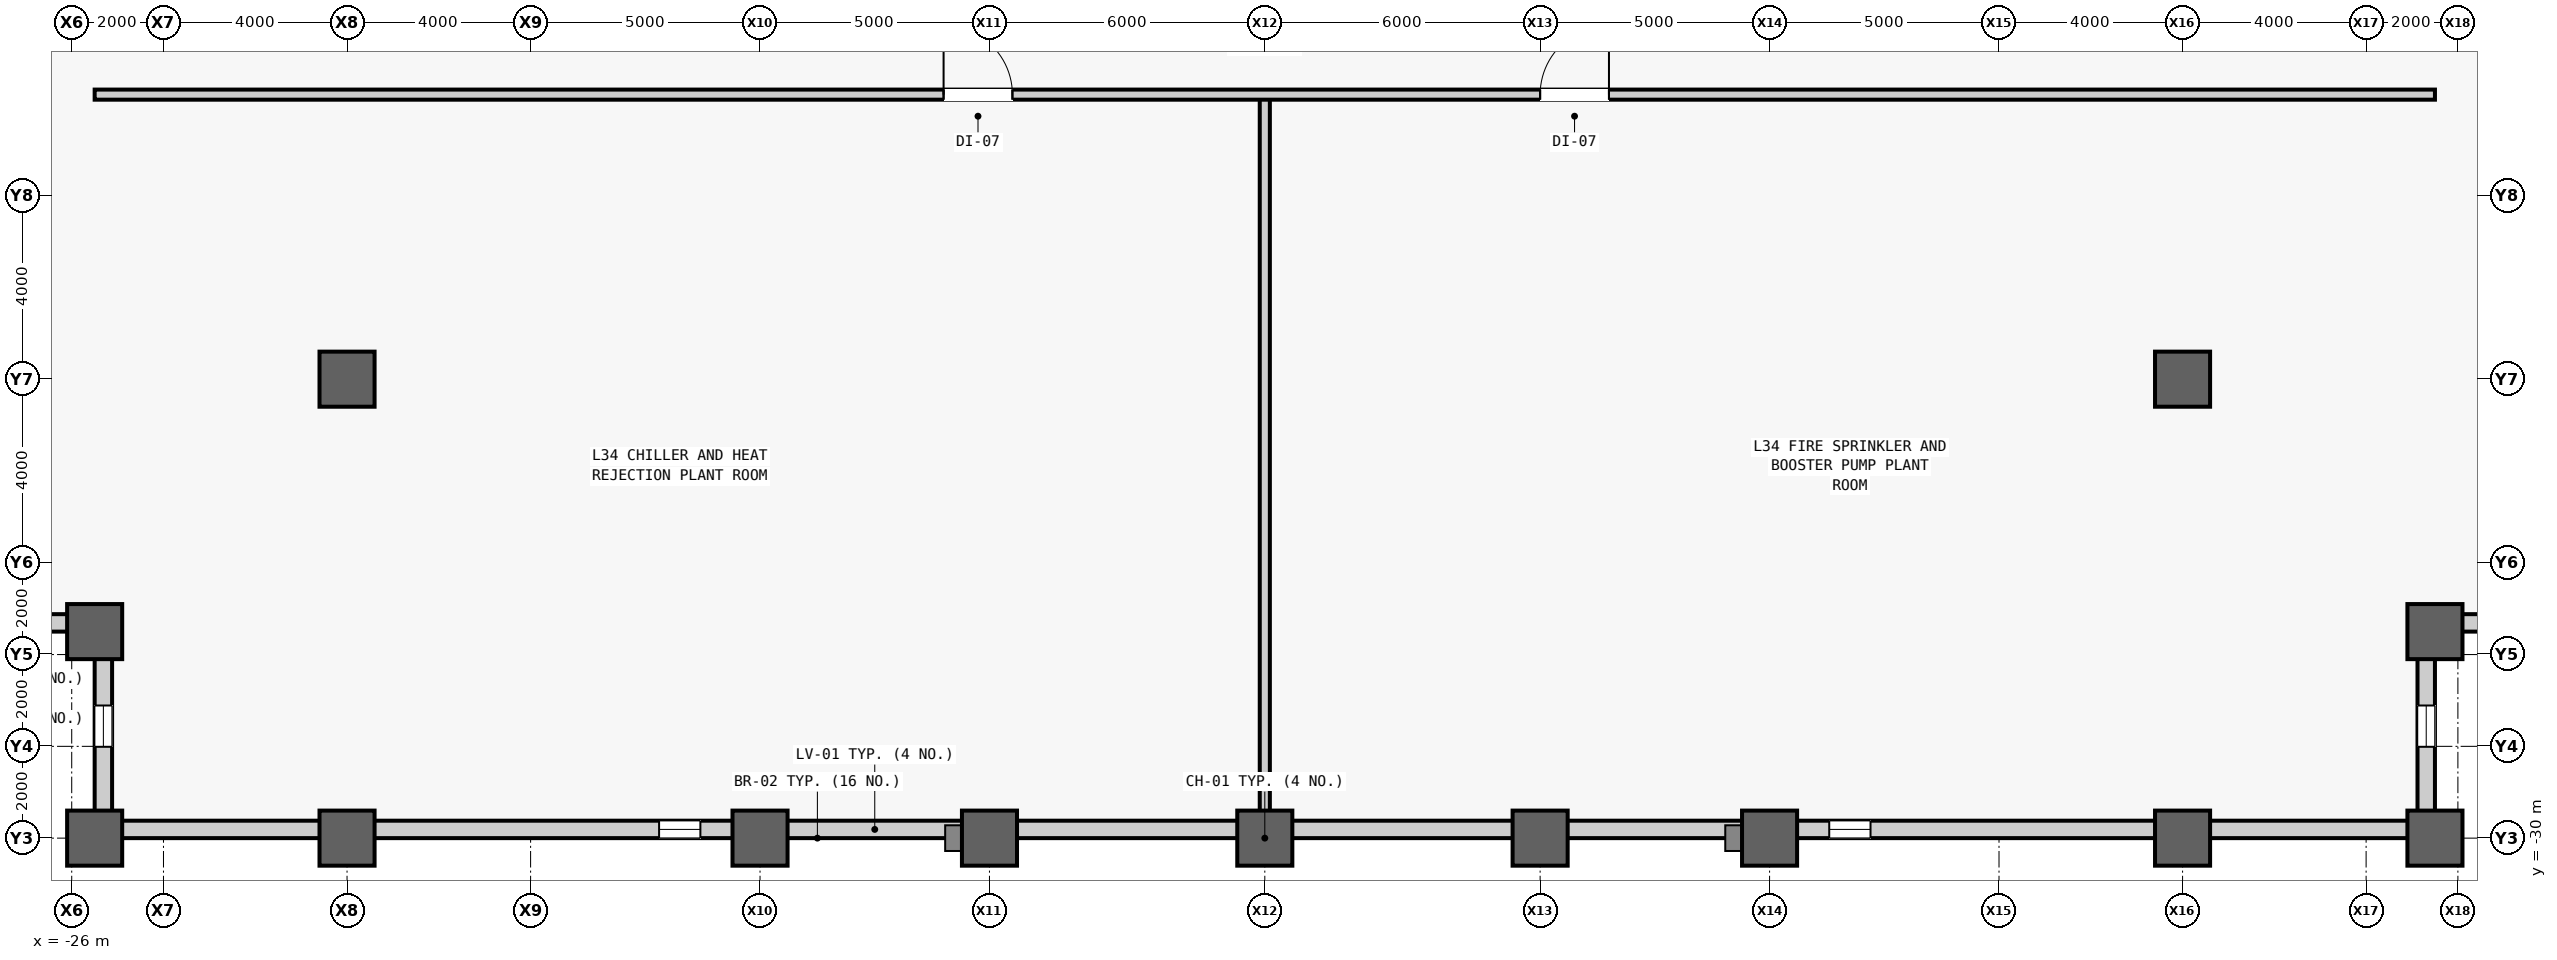
"""IFC4 building model, lengths in metres.
Left out: names, types, materials, properties, quantities, classifications, styles, units other than length and angle.
Written with IfcOpenShell. Run it as: python <this file> out.ifc"""

import sys

from ifc_helpers import new_model, si_unit, direction, frame, frame_2d, origin, origin_2d, place, context, subcontext, project, spatial, rectangle, hollow_rectangle, extrude, source, transform, mapped, element, fill, save


model = new_model("IFC4")
c1 = context("Model", 3, precision=1e-05, world=origin(), true_north=direction((0.0, 1.0)))
c2 = subcontext(c1, "Body", "Model", "MODEL_VIEW")
j1 = project(units=[si_unit("LENGTHUNIT", "METRE"), si_unit("PLANEANGLEUNIT", "RADIAN")], contexts=[c1])
p1 = place(None, origin())
s1 = spatial("IfcSite", under=j1, at=p1, CompositionType="ELEMENT")
p2 = place(p1, origin())
s2 = spatial("IfcBuilding", under=s1, at=p2, CompositionType="ELEMENT")
p3 = place(p2, frame((0.0, 0.0, 149.9)))
s3 = spatial("IfcBuildingStorey", under=s2, at=p3, CompositionType="ELEMENT", Elevation=149.9)
m1 = source(origin(), c2, "Body", "SweptSolid", [
    extrude(hollow_rectangle(XDim=1.2, YDim=1.2, WallThickness=0.07, at=origin_2d()), origin(), (0.0, 0.0, 1.0), 5.2),
])
for number, where, z_axis, x_axis in (
    (1, (-25.5, -30.0, 0.0), (0.0, 0.0, 1.0), (1.0, 0.0, 0.0)),
    (2, (-25.5, -25.5, 0.0), (0.0, 0.0, 1.0), (1.0, 0.0, 0.0)),
    (3, (-20.0, -30.0, 0.0), (0.0, 0.0, 1.0), (1.0, 0.0, 0.0)),
    (4, (-20.0, -20.0, 0.0), (0.0, 0.0, 1.0), (1.0, 0.0, 0.0)),
    (5, (-11.0, -30.0, 0.0), (0.0, 0.0, 1.0), (1.0, 0.0, 0.0)),
    (6, (-6.0, -30.0, 0.0), (0.0, 0.0, 1.0), (1.0, 0.0, 0.0)),
    (7, (0.0, -30.0, 0.0), (0.0, 0.0, 1.0), (1.0, 0.0, 0.0)),
    (8, (6.0, -30.0, 0.0), (0.0, 0.0, 1.0), (1.0, 0.0, 0.0)),
    (9, (11.0, -30.0, 0.0), (0.0, 0.0, 1.0), (1.0, 0.0, 0.0)),
    (10, (20.0, -30.0, 0.0), (0.0, 0.0, 1.0), (1.0, 0.0, 0.0)),
    (11, (20.0, -20.0, 0.0), (0.0, 0.0, 1.0), (1.0, 0.0, 0.0)),
    (12, (25.5, -30.0, 0.0), (0.0, 0.0, 1.0), (1.0, 0.0, 0.0)),
    (13, (25.5, -25.5, 0.0), (0.0, 0.0, 1.0), (1.0, 0.0, 0.0)),
):
    element("IfcColumn", number, at=place(p3, frame(where, z_axis=z_axis, x_axis=x_axis)), inside=s3, PredefinedType="COLUMN", context=c2, shape_type="MappedRepresentation", body=[
        mapped(m1, transform((0.0, 0.0, 0.0), scale=1.0)),
    ])
m2 = source(origin(), c2, "Body", "SweptSolid", [
    extrude(rectangle(XDim=4.12, YDim=0.38, at=frame_2d((2.06, 0.0))), origin(), (0.0, 0.0, 1.0), 4.285),
])
p4 = place(p3, frame((-25.5, -25.31, 0.0), z_axis=(0.0, 0.0, 1.0), x_axis=(-1.0, 0.0, 0.0)))
e14 = element("IfcWall", 14, at=p4, inside=s3, PredefinedType="STANDARD", context=c2, shape_type="MappedRepresentation", body=[
    mapped(m2, transform((0.0, 0.0, 0.0), scale=1.0)),
])
m3 = source(origin(), c2, "Body", "SweptSolid", [
    extrude(rectangle(XDim=0.9, YDim=2.4, at=frame_2d((0.45, 1.2))), frame((0.0, 0.2, 0.0), z_axis=(0.0, -1.0, 0.0), x_axis=(1.0, 0.0, 0.0)), (0.0, 0.0, 1.0), 0.4),
])
p5 = place(p4, frame((1.61, 0.0, 0.7)))
e15 = element("IfcOpeningElement", 15, at=p5, cuts=e14, PredefinedType="OPENING", context=c2, shape_type="MappedRepresentation", body=[
    mapped(m3, transform((0.0, 0.0, 0.0), scale=1.0)),
])
m4 = source(origin(), c2, "Body", "SweptSolid", [
    extrude(rectangle(XDim=4.12, YDim=0.38, at=frame_2d((2.06, 0.0))), origin(), (0.0, 0.0, 1.0), 4.205),
])
p6 = place(p3, frame((-25.31, -29.62, 0.0), z_axis=(0.0, 0.0, 1.0), x_axis=(0.0, 1.0, 0.0)))
e16 = element("IfcWall", 16, at=p6, inside=s3, PredefinedType="STANDARD", context=c2, shape_type="MappedRepresentation", body=[
    mapped(m4, transform((0.0, 0.0, 0.0), scale=1.0)),
])
p7 = place(p6, frame((1.61, 0.0, 0.7)))
e17 = element("IfcOpeningElement", 17, at=p7, cuts=e16, PredefinedType="OPENING", context=c2, shape_type="MappedRepresentation", body=[
    mapped(m3, transform((0.0, 0.0, 0.0), scale=1.0)),
])
p8 = place(p3, frame((25.31, -29.62, 0.0), z_axis=(0.0, 0.0, 1.0), x_axis=(0.0, 1.0, 0.0)))
e18 = element("IfcWall", 18, at=p8, inside=s3, PredefinedType="STANDARD", context=c2, shape_type="MappedRepresentation", body=[
    mapped(m4, transform((0.0, 0.0, 0.0), scale=1.0)),
])
p9 = place(p8, frame((1.61, 0.0, 0.7)))
e19 = element("IfcOpeningElement", 19, at=p9, cuts=e18, PredefinedType="OPENING", context=c2, shape_type="MappedRepresentation", body=[
    mapped(m3, transform((0.0, 0.0, 0.0), scale=1.0)),
])
p10 = place(p3, frame((25.5, -25.31, 0.0), z_axis=(0.0, 0.0, 1.0), x_axis=(1.0, 0.0, 0.0)))
e20 = element("IfcWall", 20, at=p10, inside=s3, PredefinedType="STANDARD", context=c2, shape_type="MappedRepresentation", body=[
    mapped(m2, transform((0.0, 0.0, 0.0), scale=1.0)),
])
p11 = place(p10, frame((1.61, 0.0, 0.7)))
e21 = element("IfcOpeningElement", 21, at=p11, cuts=e20, PredefinedType="OPENING", context=c2, shape_type="MappedRepresentation", body=[
    mapped(m3, transform((0.0, 0.0, 0.0), scale=1.0)),
])
m5 = source(origin(), c2, "Body", "SweptSolid", [
    extrude(rectangle(XDim=51.0, YDim=0.38, at=frame_2d((25.5, 0.0))), origin(), (0.0, 0.0, 1.0), 4.205),
])
p12 = place(p3, frame((-25.5, -29.81, 0.0), z_axis=(0.0, 0.0, 1.0), x_axis=(1.0, 0.0, 0.0)))
e22 = element("IfcWall", 22, at=p12, inside=s3, PredefinedType="STANDARD", context=c2, shape_type="MappedRepresentation", body=[
    mapped(m5, transform((0.0, 0.0, 0.0), scale=1.0)),
])
p13 = place(p12, frame((12.3, 0.0, 0.7)))
e23 = element("IfcOpeningElement", 23, at=p13, cuts=e22, PredefinedType="OPENING", context=c2, shape_type="MappedRepresentation", body=[
    mapped(m3, transform((0.0, 0.0, 0.0), scale=1.0)),
])
p14 = place(p12, frame((37.8, 0.0, 0.7)))
e24 = element("IfcOpeningElement", 24, at=p14, cuts=e22, PredefinedType="OPENING", context=c2, shape_type="MappedRepresentation", body=[
    mapped(m3, transform((0.0, 0.0, 0.0), scale=1.0)),
])
m6 = source(origin(), c2, "Body", "SweptSolid", [
    extrude(rectangle(XDim=16.2, YDim=0.22, at=frame_2d((8.1, 0.0))), origin(), (0.0, 0.0, 1.0), 4.127),
])
p15 = place(p3, frame((0.0, -30.0, 0.0), z_axis=(0.0, 0.0, 1.0), x_axis=(0.0, 1.0, 0.0)))
e25 = element("IfcWall", 25, at=p15, inside=s3, PredefinedType="PARTITIONING", context=c2, shape_type="MappedRepresentation", body=[
    mapped(m6, transform((0.0, 0.0, 0.0), scale=1.0)),
])
m7 = source(origin(), c2, "Body", "SweptSolid", [
    extrude(rectangle(XDim=51.0, YDim=0.22, at=frame_2d((25.5, 0.0))), origin(), (0.0, 0.0, 1.0), 4.98),
])
p16 = place(p3, frame((-25.5, -13.8, 0.0), z_axis=(0.0, 0.0, 1.0), x_axis=(1.0, 0.0, 0.0)))
e26 = element("IfcWall", 26, at=p16, inside=s3, PredefinedType="PARTITIONING", context=c2, shape_type="MappedRepresentation", body=[
    mapped(m7, transform((0.0, 0.0, 0.0), scale=1.0)),
])
m8 = source(origin(), c2, "Body", "SweptSolid", [
    extrude(rectangle(XDim=1.5, YDim=2.3, at=frame_2d((0.75, 1.15))), frame((0.0, 0.12, 0.0), z_axis=(0.0, -1.0, 0.0), x_axis=(1.0, 0.0, 0.0)), (0.0, 0.0, 1.0), 0.24),
])
p17 = place(p16, frame((18.5, 0.0, 0.0)))
e27 = element("IfcOpeningElement", 27, at=p17, cuts=e26, PredefinedType="OPENING", context=c2, shape_type="MappedRepresentation", body=[
    mapped(m8, transform((0.0, 0.0, 0.0), scale=1.0)),
])
p18 = place(p16, frame((31.5, 0.0, 0.0)))
e28 = element("IfcOpeningElement", 28, at=p18, cuts=e26, PredefinedType="OPENING", context=c2, shape_type="MappedRepresentation", body=[
    mapped(m8, transform((0.0, 0.0, 0.0), scale=1.0)),
])
m9 = source(origin(), c2, "Body", "SweptSolid", [
    extrude(rectangle(XDim=0.9, YDim=2.4, at=frame_2d((0.45, 1.2))), frame((0.0, 0.03, 0.0), z_axis=(0.0, -1.0, 0.0), x_axis=(1.0, 0.0, 0.0)), (0.0, 0.0, 1.0), 0.06),
])
p19 = place(p7, origin())
e29 = element("IfcWindow", 29, at=p19, inside=s3, PartitioningType="SINGLE_PANEL", PredefinedType="WINDOW", context=c2, shape_type="MappedRepresentation", body=[
    mapped(m9, transform((0.0, 0.0, 0.0), scale=1.0)),
])
fill(e17, e29)
p20 = place(p9, origin())
e30 = element("IfcWindow", 30, at=p20, inside=s3, PartitioningType="SINGLE_PANEL", PredefinedType="WINDOW", context=c2, shape_type="MappedRepresentation", body=[
    mapped(m9, transform((0.0, 0.0, 0.0), scale=1.0)),
])
fill(e19, e30)
p21 = place(p13, origin())
e31 = element("IfcWindow", 31, at=p21, inside=s3, PartitioningType="SINGLE_PANEL", PredefinedType="WINDOW", context=c2, shape_type="MappedRepresentation", body=[
    mapped(m9, transform((0.0, 0.0, 0.0), scale=1.0)),
])
fill(e23, e31)
p22 = place(p14, origin())
e32 = element("IfcWindow", 32, at=p22, inside=s3, PartitioningType="SINGLE_PANEL", PredefinedType="WINDOW", context=c2, shape_type="MappedRepresentation", body=[
    mapped(m9, transform((0.0, 0.0, 0.0), scale=1.0)),
])
fill(e24, e32)
m10 = source(origin(), c2, "Body", "SweptSolid", [
    extrude(rectangle(XDim=1.5, YDim=2.3, at=frame_2d((0.75, 1.15))), frame((0.0, 0.025, 0.0), z_axis=(0.0, -1.0, 0.0), x_axis=(1.0, 0.0, 0.0)), (0.0, 0.0, 1.0), 0.05),
])
p23 = place(p17, origin())
e33 = element("IfcDoor", 33, at=p23, inside=s3, OperationType="SINGLE_SWING_LEFT", PredefinedType="DOOR", context=c2, shape_type="MappedRepresentation", body=[
    mapped(m10, transform((0.0, 0.0, 0.0), scale=1.0)),
])
fill(e27, e33)
p24 = place(p18, origin())
e34 = element("IfcDoor", 34, at=p24, inside=s3, OperationType="SINGLE_SWING_RIGHT", PredefinedType="DOOR", context=c2, shape_type="MappedRepresentation", body=[
    mapped(m10, transform((0.0, 0.0, 0.0), scale=1.0)),
])
fill(e28, e34)
save(model, sys.argv[1])
